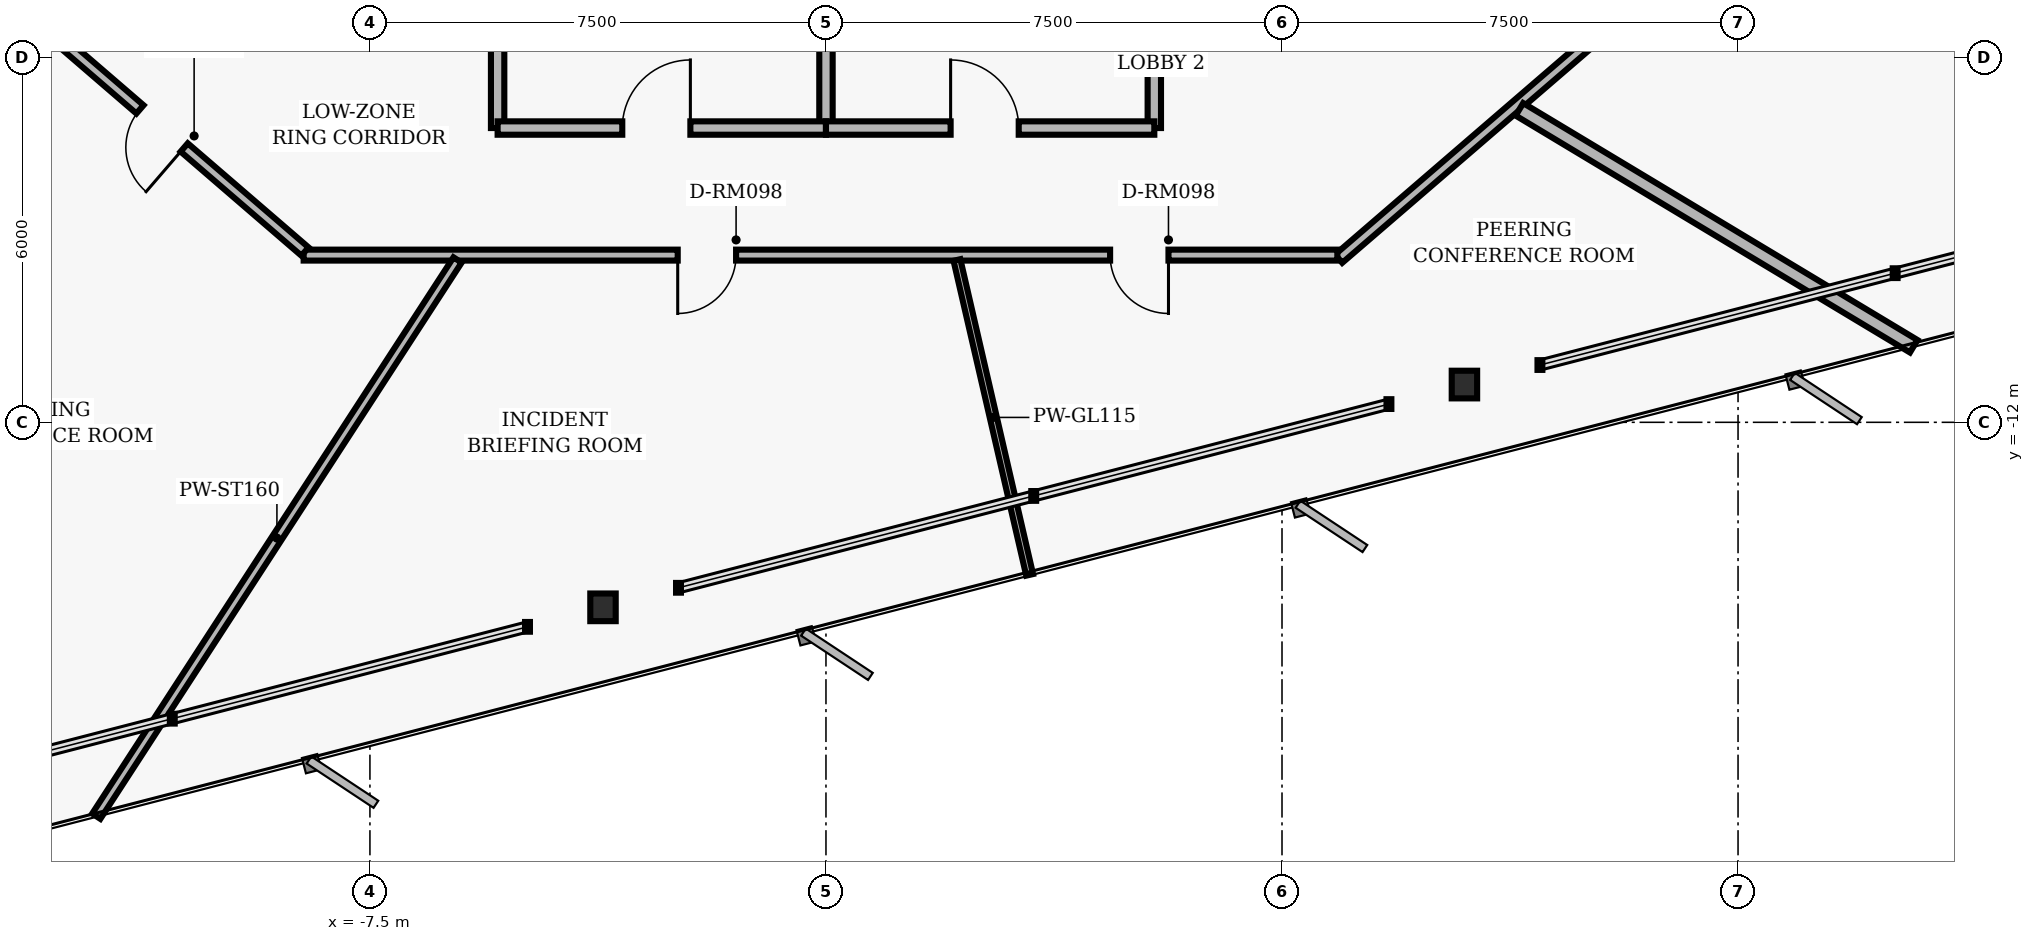
"""IFC4 building model, lengths in metres.
Left out: names, types, materials, properties, quantities, classifications, styles, units other than length and angle.
Written with IfcOpenShell. Run it as: python <this file> out.ifc"""

import sys

from ifc_helpers import new_model, si_unit, direction, frame, frame_2d, origin, origin_2d, place, context, subcontext, project, spatial, rectangle, i_section, extrude, element, fill, save


model = new_model("IFC4")
c1 = context("Model", 3, precision=1e-05, world=origin(), true_north=direction((0.0, 1.0)))
c2 = subcontext(c1, "Body", "Model", "MODEL_VIEW")
j1 = project(units=[si_unit("LENGTHUNIT", "METRE"), si_unit("PLANEANGLEUNIT", "RADIAN")], contexts=[c1])
p1 = place(None, origin())
s1 = spatial("IfcSite", under=j1, at=p1, CompositionType="ELEMENT")
p2 = place(p1, origin())
s2 = spatial("IfcBuilding", under=s1, at=p2, CompositionType="ELEMENT")
p3 = place(p2, frame((0.0, 0.0, 76.48)))
s3 = spatial("IfcBuildingStorey", under=s2, at=p3, CompositionType="ELEMENT", Elevation=76.48)
for number, where, z_axis, x_axis in (
    (1, (-3.667, -15.043, 0.0), (0.0, 0.0, 1.0), (1.0, 0.0, 0.0)),
    (2, (10.5, -11.379, 0.0), (0.0, 0.0, 1.0), (1.0, 0.0, 0.0)),
):
    element("IfcColumn", number, at=place(p3, frame(where, z_axis=z_axis, x_axis=x_axis)), inside=s3, PredefinedType="COLUMN", context=c2, shape_type="SweptSolid", body=[
        extrude(i_section(OverallWidth=0.418, OverallDepth=0.455, WebThickness=0.042, FlangeThickness=0.068, FilletRadius=0.025, at=origin_2d()), origin(), (0.0, 0.0, 1.0), 3.04),
    ])
for number, where, z_axis, x_axis in (
    (3, (-5.4, -7.16, 0.0), (0.0, 0.0, 1.0), (0.0, 1.0, 0.0)),
    (4, (5.4, -7.16, 0.0), (0.0, 0.0, 1.0), (0.0, 1.0, 0.0)),
):
    element("IfcWall", number, at=place(p3, frame(where, z_axis=z_axis, x_axis=x_axis)), inside=s3, PredefinedType="PARTITIONING", context=c2, shape_type="SweptSolid", body=[
        extrude(rectangle(XDim=2.71, YDim=0.22, at=frame_2d((1.355, 0.0))), origin(), (0.0, 0.0, 1.0), 2.763),
    ])
p4 = place(p3, frame((0.0, -7.16, 0.0), z_axis=(0.0, 0.0, 1.0), x_axis=(0.0, 1.0, 0.0)))
e5 = element("IfcWall", 5, at=p4, inside=s3, PredefinedType="PARTITIONING", context=c2, shape_type="SweptSolid", body=[
    extrude(rectangle(XDim=2.81, YDim=0.22, at=frame_2d((1.405, 0.0))), origin(), (0.0, 0.0, 1.0), 2.763),
])
p5 = place(p3, frame((-5.4, -7.16, 0.0), z_axis=(0.0, 0.0, 1.0), x_axis=(1.0, 0.0, 0.0)))
e6 = element("IfcWall", 6, at=p5, inside=s3, PredefinedType="PARTITIONING", context=c2, shape_type="SweptSolid", body=[
    extrude(rectangle(XDim=5.4, YDim=0.22, at=frame_2d((2.7, 0.0))), origin(), (0.0, 0.0, 1.0), 2.763),
])
p6 = place(p5, frame((2.05, 0.0, 0.0)))
e7 = element("IfcOpeningElement", 7, at=p6, cuts=e6, PredefinedType="OPENING", context=c2, shape_type="SweptSolid", body=[
    extrude(rectangle(XDim=1.12, YDim=2.02, at=frame_2d((0.56, 1.01))), frame((0.0, 0.12, 0.0), z_axis=(0.0, -1.0, 0.0), x_axis=(1.0, 0.0, 0.0)), (0.0, 0.0, 1.0), 0.24),
])
p7 = place(p3, frame((0.0, -7.16, 0.0), z_axis=(0.0, 0.0, 1.0), x_axis=(1.0, 0.0, 0.0)))
e8 = element("IfcWall", 8, at=p7, inside=s3, PredefinedType="PARTITIONING", context=c2, shape_type="SweptSolid", body=[
    extrude(rectangle(XDim=5.4, YDim=0.22, at=frame_2d((2.7, 0.0))), origin(), (0.0, 0.0, 1.0), 2.763),
])
p8 = place(p7, frame((2.05, 0.0, 0.0)))
e9 = element("IfcOpeningElement", 9, at=p8, cuts=e8, PredefinedType="OPENING", context=c2, shape_type="SweptSolid", body=[
    extrude(rectangle(XDim=1.12, YDim=2.02, at=frame_2d((0.56, 1.01))), frame((0.0, 0.12, 0.0), z_axis=(0.0, -1.0, 0.0), x_axis=(1.0, 0.0, 0.0)), (0.0, 0.0, 1.0), 0.24),
])
p9 = place(p3, frame((13.268, -5.141, 0.0), z_axis=(0.0, 0.0, 1.0), x_axis=(-0.757534501725, -0.65279512766, 0.0)))
e10 = element("IfcWall", 10, at=p9, inside=s3, PredefinedType="PARTITIONING", context=c2, shape_type="SweptSolid", body=[
    extrude(rectangle(XDim=6.385, YDim=0.18, at=frame_2d((3.192, 0.0))), origin(), (0.0, 0.0, 1.0), 2.763),
])
p10 = place(p3, frame((8.41, -9.25, 0.0), z_axis=(0.0, 0.0, 1.0), x_axis=(-1.0, 0.0, 0.0)))
e11 = element("IfcWall", 11, at=p10, inside=s3, PredefinedType="PARTITIONING", context=c2, shape_type="SweptSolid", body=[
    extrude(rectangle(XDim=17.0, YDim=0.18, at=frame_2d((8.5, 0.0))), origin(), (0.0, 0.0, 1.0), 2.277),
])
p11 = place(p10, frame((9.888, 0.0, 0.0)))
e12 = element("IfcOpeningElement", 12, at=p11, cuts=e11, PredefinedType="OPENING", context=c2, shape_type="SweptSolid", body=[
    extrude(rectangle(XDim=0.96, YDim=2.02, at=frame_2d((0.48, 1.01))), frame((0.0, 0.1, 0.0), z_axis=(0.0, -1.0, 0.0), x_axis=(1.0, 0.0, 0.0)), (0.0, 0.0, 1.0), 0.2),
])
p12 = place(p10, frame((2.777, 0.0, 0.0)))
e13 = element("IfcOpeningElement", 13, at=p12, cuts=e11, PredefinedType="OPENING", context=c2, shape_type="SweptSolid", body=[
    extrude(rectangle(XDim=0.96, YDim=2.02, at=frame_2d((0.48, 1.01))), frame((0.0, 0.1, 0.0), z_axis=(0.0, -1.0, 0.0), x_axis=(1.0, 0.0, 0.0)), (0.0, 0.0, 1.0), 0.2),
])
p13 = place(p3, frame((-8.568, -9.191, 0.0), z_axis=(0.0, 0.0, 1.0), x_axis=(-0.757556899173, 0.652769135694, 0.0)))
e14 = element("IfcWall", 14, at=p13, inside=s3, PredefinedType="PARTITIONING", context=c2, shape_type="SweptSolid", body=[
    extrude(rectangle(XDim=6.204, YDim=0.18, at=frame_2d((3.102, 0.0))), origin(), (0.0, 0.0, 1.0), 2.763),
])
p14 = place(p13, frame((2.622, 0.0, 0.0)))
e15 = element("IfcOpeningElement", 15, at=p14, cuts=e14, PredefinedType="OPENING", context=c2, shape_type="SweptSolid", body=[
    extrude(rectangle(XDim=0.96, YDim=2.02, at=frame_2d((0.48, 1.01))), frame((0.0, 0.1, 0.0), z_axis=(0.0, -1.0, 0.0), x_axis=(1.0, 0.0, 0.0)), (0.0, 0.0, 1.0), 0.2),
])
p15 = place(p3, frame((-6.059, -9.33, 0.0), z_axis=(0.0, 0.0, 1.0), x_axis=(-0.544635087887, -0.838673131227, 0.0)))
e16 = element("IfcWall", 16, at=p15, inside=s3, PredefinedType="PARTITIONING", context=c2, shape_type="SweptSolid", body=[
    extrude(rectangle(XDim=10.908, YDim=0.16, at=frame_2d((5.454, 0.0))), origin(), (0.0, 0.0, 1.0), 2.763),
])
p16 = place(p3, frame((2.154, -9.33, 0.0), z_axis=(0.0, 0.0, 1.0), x_axis=(0.22493330832, -0.974374161607, 0.0)))
e17 = element("IfcWall", 17, at=p16, inside=s3, PredefinedType="MOVABLE", context=c2, shape_type="SweptSolid", body=[
    extrude(rectangle(XDim=5.315, YDim=0.115, at=frame_2d((2.658, 0.0))), origin(), (0.0, 0.0, 1.0), 2.763),
])
p17 = place(p3, frame((11.405, -6.853, 0.0), z_axis=(0.0, 0.0, 1.0), x_axis=(0.857165278127, -0.515041441025, 0.0)))
e18 = element("IfcWall", 18, at=p17, inside=s3, PredefinedType="PARTITIONING", context=c2, shape_type="SweptSolid", body=[
    extrude(rectangle(XDim=7.565, YDim=0.24, at=frame_2d((3.782, 0.0))), origin(), (0.0, 0.0, 1.0), 2.763),
])
p18 = place(p6, origin())
e19 = element("IfcDoor", 19, at=p18, inside=s3, OperationType="SINGLE_SWING_RIGHT", PredefinedType="DOOR", context=c2, shape_type="SweptSolid", body=[
    extrude(rectangle(XDim=1.12, YDim=2.02, at=frame_2d((0.56, 1.01))), frame((0.0, 0.025, 0.0), z_axis=(0.0, -1.0, 0.0), x_axis=(1.0, 0.0, 0.0)), (0.0, 0.0, 1.0), 0.05),
])
fill(e7, e19)
p19 = place(p8, origin())
e20 = element("IfcDoor", 20, at=p19, inside=s3, OperationType="SINGLE_SWING_LEFT", PredefinedType="DOOR", context=c2, shape_type="SweptSolid", body=[
    extrude(rectangle(XDim=1.12, YDim=2.02, at=frame_2d((0.56, 1.01))), frame((0.0, 0.025, 0.0), z_axis=(0.0, -1.0, 0.0), x_axis=(1.0, 0.0, 0.0)), (0.0, 0.0, 1.0), 0.05),
])
fill(e9, e20)
p20 = place(p14, origin())
e21 = element("IfcDoor", 21, at=p20, inside=s3, OperationType="SINGLE_SWING_LEFT", PredefinedType="DOOR", context=c2, shape_type="SweptSolid", body=[
    extrude(rectangle(XDim=0.96, YDim=2.02, at=frame_2d((0.48, 1.01))), frame((0.0, 0.025, 0.0), z_axis=(0.0, -1.0, 0.0), x_axis=(1.0, 0.0, 0.0)), (0.0, 0.0, 1.0), 0.05),
])
fill(e15, e21)
p21 = place(p11, origin())
e22 = element("IfcDoor", 22, at=p21, inside=s3, OperationType="SINGLE_SWING_RIGHT", PredefinedType="DOOR", context=c2, shape_type="SweptSolid", body=[
    extrude(rectangle(XDim=0.96, YDim=2.02, at=frame_2d((0.48, 1.01))), frame((0.0, 0.025, 0.0), z_axis=(0.0, -1.0, 0.0), x_axis=(1.0, 0.0, 0.0)), (0.0, 0.0, 1.0), 0.05),
])
fill(e12, e22)
p22 = place(p12, origin())
e23 = element("IfcDoor", 23, at=p22, inside=s3, OperationType="SINGLE_SWING_LEFT", PredefinedType="DOOR", context=c2, shape_type="SweptSolid", body=[
    extrude(rectangle(XDim=0.96, YDim=2.02, at=frame_2d((0.48, 1.01))), frame((0.0, 0.025, 0.0), z_axis=(0.0, -1.0, 0.0), x_axis=(1.0, 0.0, 0.0)), (0.0, 0.0, 1.0), 0.05),
])
fill(e13, e23)
save(model, sys.argv[1])
